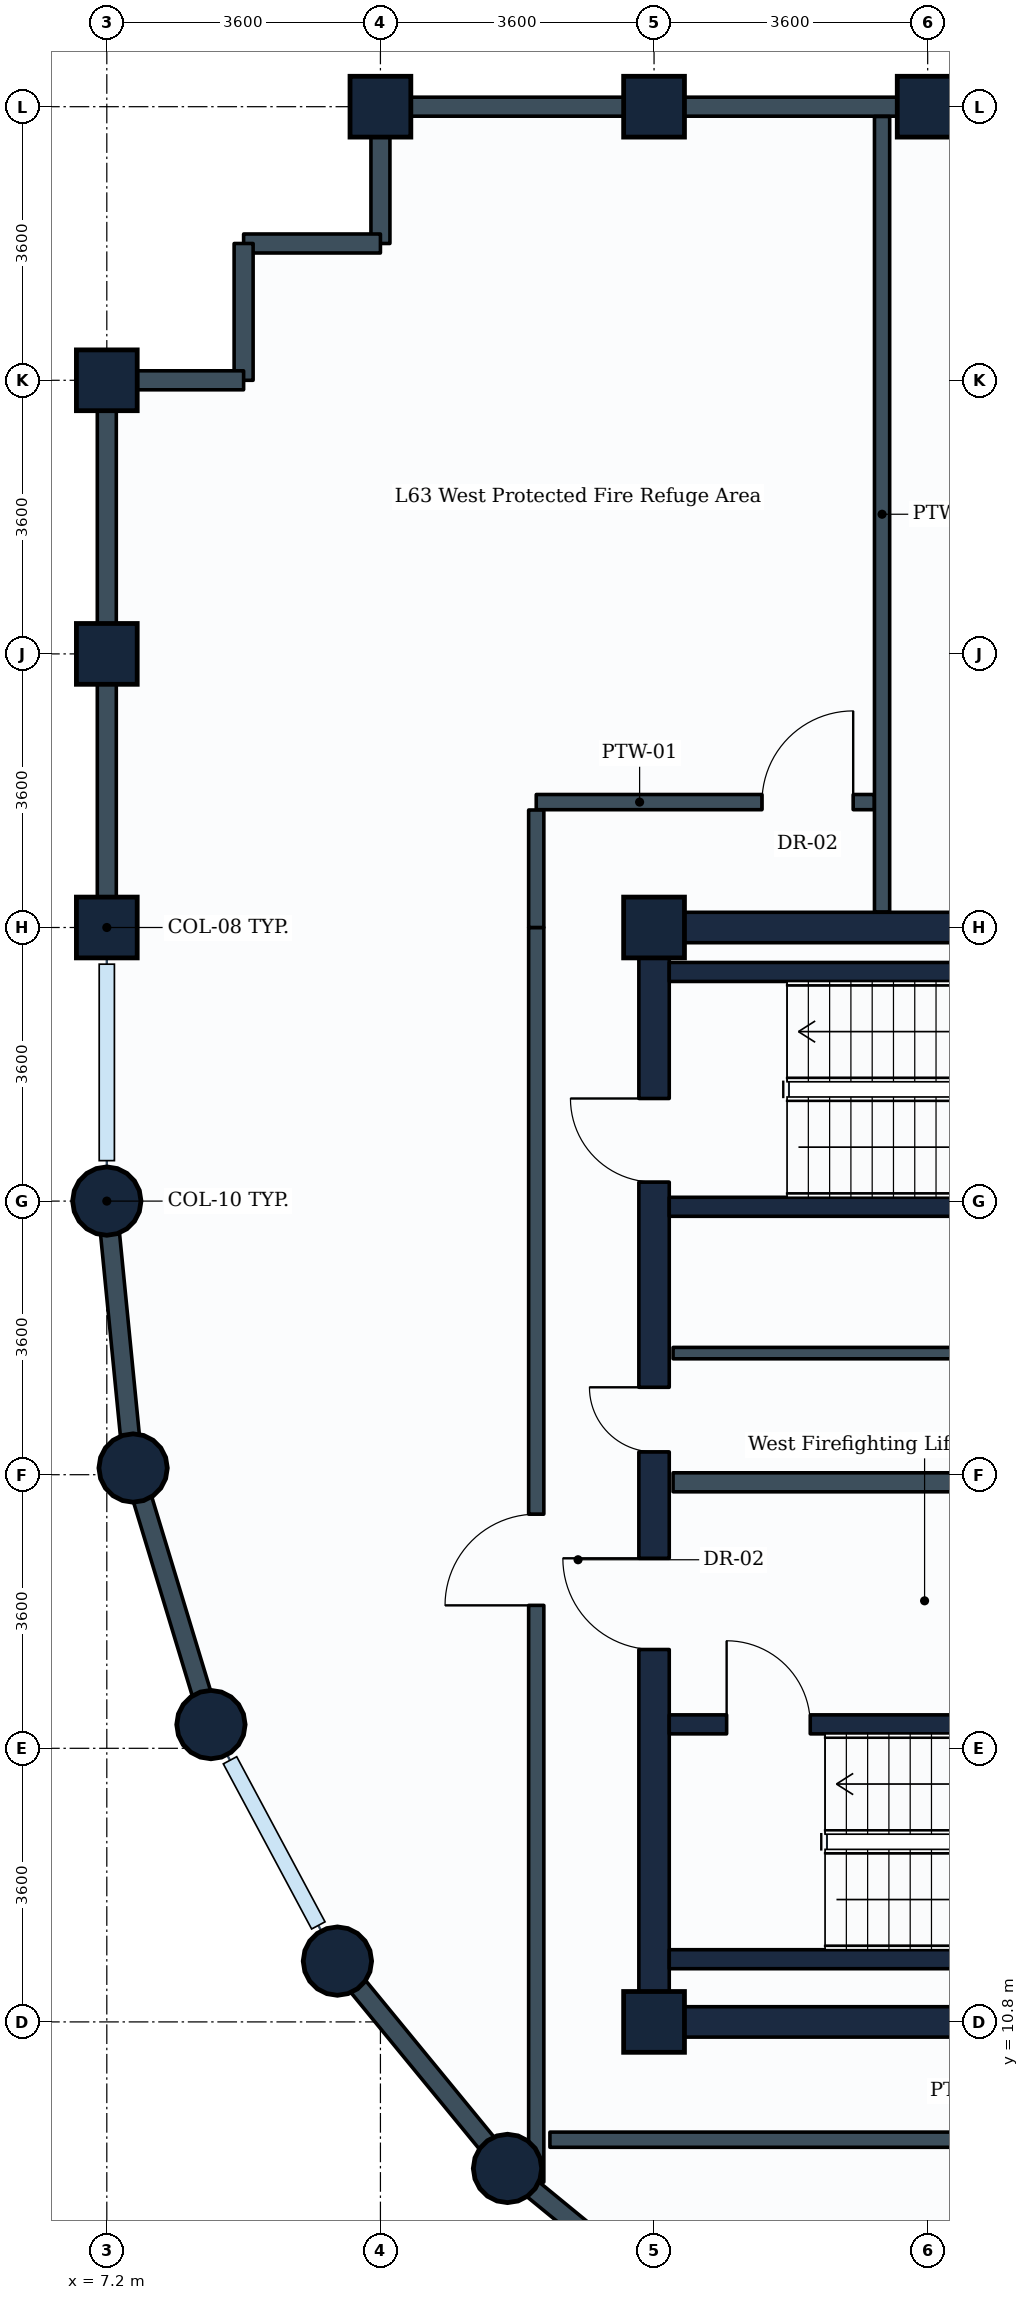
"""IFC4 building model, lengths in metres.
Left out: names, types, materials, properties, quantities, classifications, styles, units other than length and angle.
Written with IfcOpenShell. Run it as: python <this file> out.ifc"""

import sys

from ifc_helpers import new_model, si_unit, direction, frame, frame_2d, origin, origin_2d, place, context, subcontext, project, spatial, rectangle, circle, extrude, element, fill, save


model = new_model("IFC4")
c1 = context("Model", 3, precision=1e-05, world=origin(), true_north=direction((0.0, 1.0)))
c2 = subcontext(c1, "Body", "Model", "MODEL_VIEW")
j1 = project(units=[si_unit("LENGTHUNIT", "METRE"), si_unit("PLANEANGLEUNIT", "RADIAN")], contexts=[c1])
p1 = place(None, origin())
s1 = spatial("IfcSite", under=j1, at=p1, CompositionType="ELEMENT")
p2 = place(p1, origin())
s2 = spatial("IfcBuilding", under=s1, at=p2, CompositionType="ELEMENT")
p3 = place(p2, frame((0.0, 0.0, 249.8)))
s3 = spatial("IfcBuildingStorey", under=s2, at=p3, CompositionType="ELEMENT", Elevation=249.8)
p4 = place(p3, frame((7.2, 21.6, 0.0), z_axis=(0.0, 0.0, 1.0), x_axis=(1.0, 0.0, 0.0)))
e1 = element("IfcColumn", 1, at=p4, inside=s3, PredefinedType="COLUMN", context=c2, shape_type="SweptSolid", body=[
    extrude(circle(Radius=0.45, at=origin_2d()), origin(), (0.0, 0.0, 1.0), 6.0),
])
for number, where, z_axis, x_axis in (
    (2, (7.2, 25.2, 0.0), (0.0, 0.0, 1.0), (0.0, 1.0, 0.0)),
    (3, (7.2, 28.8, 0.0), (0.0, 0.0, 1.0), (0.0, 1.0, 0.0)),
    (4, (7.2, 32.4, 0.0), (0.0, 0.0, 1.0), (0.0, 1.0, 0.0)),
):
    element("IfcColumn", number, at=place(p3, frame(where, z_axis=z_axis, x_axis=x_axis)), inside=s3, PredefinedType="COLUMN", context=c2, shape_type="SweptSolid", body=[
        extrude(rectangle(XDim=0.8, YDim=0.8, at=origin_2d()), origin(), (0.0, 0.0, 1.0), 6.0),
    ])
for number, where, z_axis, x_axis in (
    (5, (7.546, 18.088, 0.0), (0.0, 0.0, 1.0), (1.0, 0.0, 0.0)),
    (6, (8.57, 14.712, 0.0), (0.0, 0.0, 1.0), (1.0, 0.0, 0.0)),
    (7, (10.234, 11.6, 0.0), (0.0, 0.0, 1.0), (1.0, 0.0, 0.0)),
):
    element("IfcColumn", number, at=place(p3, frame(where, z_axis=z_axis, x_axis=x_axis)), inside=s3, PredefinedType="COLUMN", context=c2, shape_type="SweptSolid", body=[
        extrude(circle(Radius=0.45, at=origin_2d()), origin(), (0.0, 0.0, 1.0), 6.0),
    ])
p5 = place(p3, frame((10.8, 36.0, 0.0), z_axis=(0.0, 0.0, 1.0), x_axis=(1.0, 0.0, 0.0)))
e8 = element("IfcColumn", 8, at=p5, inside=s3, PredefinedType="COLUMN", context=c2, shape_type="SweptSolid", body=[
    extrude(rectangle(XDim=0.8, YDim=0.8, at=origin_2d()), origin(), (0.0, 0.0, 1.0), 6.0),
])
p6 = place(p3, frame((12.472, 8.872, 0.0), z_axis=(0.0, 0.0, 1.0), x_axis=(1.0, 0.0, 0.0)))
e9 = element("IfcColumn", 9, at=p6, inside=s3, PredefinedType="COLUMN", context=c2, shape_type="SweptSolid", body=[
    extrude(circle(Radius=0.45, at=origin_2d()), origin(), (0.0, 0.0, 1.0), 6.0),
])
for number, where, z_axis, x_axis in (
    (10, (14.4, 10.8, 0.0), (0.0, 0.0, 1.0), (1.0, 0.0, 0.0)),
    (11, (14.4, 25.2, 0.0), (0.0, 0.0, 1.0), (1.0, 0.0, 0.0)),
    (12, (14.4, 36.0, 0.0), (0.0, 0.0, 1.0), (1.0, 0.0, 0.0)),
    (13, (18.0, 36.0, 0.0), (0.0, 0.0, 1.0), (1.0, 0.0, 0.0)),
):
    element("IfcColumn", number, at=place(p3, frame(where, z_axis=z_axis, x_axis=x_axis)), inside=s3, PredefinedType="COLUMN", context=c2, shape_type="SweptSolid", body=[
        extrude(rectangle(XDim=0.8, YDim=0.8, at=origin_2d()), origin(), (0.0, 0.0, 1.0), 6.0),
    ])
p7 = place(p3, frame((14.4, 36.0, 0.0), z_axis=(0.0, 0.0, 1.0), x_axis=(1.0, 0.0, 0.0)))
e14 = element("IfcWall", 14, at=p7, inside=s3, PredefinedType="STANDARD", context=c2, shape_type="SweptSolid", body=[
    extrude(rectangle(XDim=3.6, YDim=0.25, at=frame_2d((1.8, 0.0))), origin(), (0.0, 0.0, 1.0), 5.23),
])
p8 = place(p3, frame((10.8, 36.0, 0.0), z_axis=(0.0, 0.0, 1.0), x_axis=(1.0, 0.0, 0.0)))
e15 = element("IfcWall", 15, at=p8, inside=s3, PredefinedType="STANDARD", context=c2, shape_type="SweptSolid", body=[
    extrude(rectangle(XDim=3.6, YDim=0.25, at=frame_2d((1.8, 0.0))), origin(), (0.0, 0.0, 1.0), 5.23),
])
p9 = place(p3, frame((10.8, 34.2, 0.0), z_axis=(0.0, 0.0, 1.0), x_axis=(0.0, 1.0, 0.0)))
e16 = element("IfcWall", 16, at=p9, inside=s3, PredefinedType="STANDARD", context=c2, shape_type="SweptSolid", body=[
    extrude(rectangle(XDim=1.8, YDim=0.25, at=frame_2d((0.9, 0.0))), origin(), (0.0, 0.0, 1.0), 5.23),
])
for number, where, z_axis, x_axis in (
    (17, (9.0, 34.2, 0.0), (0.0, 0.0, 1.0), (1.0, 0.0, 0.0)),
    (18, (9.0, 32.4, 0.0), (0.0, 0.0, 1.0), (0.0, 1.0, 0.0)),
):
    element("IfcWall", number, at=place(p3, frame(where, z_axis=z_axis, x_axis=x_axis)), inside=s3, PredefinedType="STANDARD", context=c2, shape_type="SweptSolid", body=[
        extrude(rectangle(XDim=1.8, YDim=0.25, at=frame_2d((0.9, 0.0))), origin(), (0.0, 0.0, 1.0), 5.735),
    ])
p10 = place(p3, frame((7.2, 32.4, 0.0), z_axis=(0.0, 0.0, 1.0), x_axis=(1.0, 0.0, 0.0)))
e19 = element("IfcWall", 19, at=p10, inside=s3, PredefinedType="STANDARD", context=c2, shape_type="SweptSolid", body=[
    extrude(rectangle(XDim=1.8, YDim=0.25, at=frame_2d((0.9, 0.0))), origin(), (0.0, 0.0, 1.0), 5.23),
])
p11 = place(p3, frame((7.2, 28.8, 0.0), z_axis=(0.0, 0.0, 1.0), x_axis=(0.0, 1.0, 0.0)))
e20 = element("IfcWall", 20, at=p11, inside=s3, PredefinedType="STANDARD", context=c2, shape_type="SweptSolid", body=[
    extrude(rectangle(XDim=3.6, YDim=0.25, at=frame_2d((1.8, 0.0))), origin(), (0.0, 0.0, 1.0), 5.23),
])
p12 = place(p3, frame((7.2, 25.2, 0.0), z_axis=(0.0, 0.0, 1.0), x_axis=(0.0, 1.0, 0.0)))
e21 = element("IfcWall", 21, at=p12, inside=s3, PredefinedType="STANDARD", context=c2, shape_type="SweptSolid", body=[
    extrude(rectangle(XDim=3.6, YDim=0.25, at=frame_2d((1.8, 0.0))), origin(), (0.0, 0.0, 1.0), 5.23),
])
p13 = place(p3, frame((7.546, 18.088, 0.0), z_axis=(0.0, 0.0, 1.0), x_axis=(-0.09802417461, 0.995184033831, 0.0)))
e22 = element("IfcWall", 22, at=p13, inside=s3, PredefinedType="STANDARD", context=c2, shape_type="SweptSolid", body=[
    extrude(rectangle(XDim=3.529, YDim=0.25, at=frame_2d((1.765, 0.0))), origin(), (0.0, 0.0, 1.0), 5.23),
])
p14 = place(p3, frame((8.57, 14.712, 0.0), z_axis=(0.0, 0.0, 1.0), x_axis=(-0.290305086481, 0.956934144423, 0.0)))
e23 = element("IfcWall", 23, at=p14, inside=s3, PredefinedType="STANDARD", context=c2, shape_type="SweptSolid", body=[
    extrude(rectangle(XDim=3.528, YDim=0.25, at=frame_2d((1.764, 0.0))), origin(), (0.0, 0.0, 1.0), 5.23),
])
for number, where, z_axis, x_axis in (
    (24, (12.472, 8.872, 0.0), (0.0, 0.0, 1.0), (-0.634, 0.773, 0.0)),
    (25, (15.2, 6.634, 0.0), (0.0, 0.0, 1.0), (-0.773, 0.634, 0.0)),
):
    element("IfcWall", number, at=place(p3, frame(where, z_axis=z_axis, x_axis=x_axis)), inside=s3, PredefinedType="STANDARD", context=c2, shape_type="SweptSolid", body=[
        extrude(rectangle(XDim=3.529, YDim=0.25, at=frame_2d((1.764, 0.0))), origin(), (0.0, 0.0, 1.0), 5.23),
    ])
p15 = place(p3, frame((14.4, 10.8, 0.0), z_axis=(0.0, 0.0, 1.0), x_axis=(1.0, 0.0, 0.0)))
e26 = element("IfcWall", 26, at=p15, inside=s3, PredefinedType="SHEAR", context=c2, shape_type="SweptSolid", body=[
    extrude(rectangle(XDim=18.0, YDim=0.4, at=frame_2d((9.0, 0.0))), origin(), (0.0, 0.0, 1.0), 5.75),
])
p16 = place(p3, frame((14.4, 25.2, 0.0), z_axis=(0.0, 0.0, 1.0), x_axis=(1.0, 0.0, 0.0)))
e27 = element("IfcWall", 27, at=p16, inside=s3, PredefinedType="SHEAR", context=c2, shape_type="SweptSolid", body=[
    extrude(rectangle(XDim=10.8, YDim=0.4, at=frame_2d((5.4, 0.0))), origin(), (0.0, 0.0, 1.0), 5.75),
])
p17 = place(p3, frame((14.4, 10.8, 0.0), z_axis=(0.0, 0.0, 1.0), x_axis=(0.0, 1.0, 0.0)))
e28 = element("IfcWall", 28, at=p17, inside=s3, PredefinedType="SHEAR", context=c2, shape_type="SweptSolid", body=[
    extrude(rectangle(XDim=14.4, YDim=0.4, at=frame_2d((7.2, 0.0))), origin(), (0.0, 0.0, 1.0), 5.75),
])
p18 = place(p17, frame((11.05, 0.0, 0.0)))
e29 = element("IfcOpeningElement", 29, at=p18, cuts=e28, PredefinedType="OPENING", context=c2, shape_type="SweptSolid", body=[
    extrude(rectangle(XDim=1.1, YDim=2.1, at=frame_2d((0.55, 1.05))), frame((0.0, 0.21, 0.0), z_axis=(0.0, -1.0, 0.0), x_axis=(1.0, 0.0, 0.0)), (0.0, 0.0, 1.0), 0.42),
])
p19 = place(p17, frame((4.9, 0.0, 0.0)))
e30 = element("IfcOpeningElement", 30, at=p19, cuts=e28, PredefinedType="OPENING", context=c2, shape_type="SweptSolid", body=[
    extrude(rectangle(XDim=1.2, YDim=2.1, at=frame_2d((0.6, 1.05))), frame((0.0, 0.21, 0.0), z_axis=(0.0, -1.0, 0.0), x_axis=(1.0, 0.0, 0.0)), (0.0, 0.0, 1.0), 0.42),
])
p20 = place(p17, frame((7.5, 0.0, 0.0)))
e31 = element("IfcOpeningElement", 31, at=p20, cuts=e28, PredefinedType="OPENING", context=c2, shape_type="SweptSolid", body=[
    extrude(rectangle(XDim=0.85, YDim=2.1, at=frame_2d((0.425, 1.05))), frame((0.0, 0.21, 0.0), z_axis=(0.0, -1.0, 0.0), x_axis=(1.0, 0.0, 0.0)), (0.0, 0.0, 1.0), 0.42),
])
p21 = place(p3, frame((14.6, 11.625, 0.0), z_axis=(0.0, 0.0, 1.0), x_axis=(1.0, 0.0, 0.0)))
e32 = element("IfcWall", 32, at=p21, inside=s3, PredefinedType="SHEAR", context=c2, shape_type="SweptSolid", body=[
    extrude(rectangle(XDim=8.75, YDim=0.25, at=frame_2d((4.375, 0.0))), origin(), (0.0, 0.0, 1.0), 5.75),
])
p22 = place(p3, frame((14.6, 14.715, 0.0), z_axis=(0.0, 0.0, 1.0), x_axis=(1.0, 0.0, 0.0)))
e33 = element("IfcWall", 33, at=p22, inside=s3, PredefinedType="SHEAR", context=c2, shape_type="SweptSolid", body=[
    extrude(rectangle(XDim=8.75, YDim=0.25, at=frame_2d((4.375, 0.0))), origin(), (0.0, 0.0, 1.0), 5.75),
])
p23 = place(p22, frame((0.755, 0.0, 0.0)))
e34 = element("IfcOpeningElement", 34, at=p23, cuts=e33, PredefinedType="OPENING", context=c2, shape_type="SweptSolid", body=[
    extrude(rectangle(XDim=1.1, YDim=2.1, at=frame_2d((0.55, 1.05))), frame((0.0, 0.135, 0.0), z_axis=(0.0, -1.0, 0.0), x_axis=(1.0, 0.0, 0.0)), (0.0, 0.0, 1.0), 0.27),
])
for number, where, z_axis, x_axis in (
    (35, (14.6, 21.525, 0.0), (0.0, 0.0, 1.0), (1.0, 0.0, 0.0)),
    (36, (14.6, 24.615, 0.0), (0.0, 0.0, 1.0), (1.0, 0.0, 0.0)),
):
    element("IfcWall", number, at=place(p3, frame(where, z_axis=z_axis, x_axis=x_axis)), inside=s3, PredefinedType="SHEAR", context=c2, shape_type="SweptSolid", body=[
        extrude(rectangle(XDim=8.3, YDim=0.25, at=frame_2d((4.15, 0.0))), origin(), (0.0, 0.0, 1.0), 5.75),
    ])
p24 = place(p3, frame((14.65, 17.9, 0.0), z_axis=(0.0, 0.0, 1.0), x_axis=(1.0, 0.0, 0.0)))
e37 = element("IfcWall", 37, at=p24, inside=s3, PredefinedType="PARTITIONING", context=c2, shape_type="SweptSolid", body=[
    extrude(rectangle(XDim=7.15, YDim=0.25, at=frame_2d((3.575, 0.0))), origin(), (0.0, 0.0, 1.0), 5.735),
])
p25 = place(p3, frame((14.65, 19.6, 0.0), z_axis=(0.0, 0.0, 1.0), x_axis=(1.0, 0.0, 0.0)))
e38 = element("IfcWall", 38, at=p25, inside=s3, PredefinedType="PARTITIONING", context=c2, shape_type="SweptSolid", body=[
    extrude(rectangle(XDim=10.13, YDim=0.15, at=frame_2d((5.065, 0.0))), origin(), (0.0, 0.0, 1.0), 5.735),
])
p26 = place(p3, frame((17.4, 25.404, 0.0), z_axis=(0.0, 0.0, 1.0), x_axis=(0.0, 1.0, 0.0)))
e39 = element("IfcWall", 39, at=p26, inside=s3, PredefinedType="PARTITIONING", context=c2, shape_type="SweptSolid", body=[
    extrude(rectangle(XDim=10.467, YDim=0.2, at=frame_2d((5.233, 0.0))), origin(), (0.0, 0.0, 1.0), 5.23),
])
p27 = place(p3, frame((12.85, 8.691, 0.0), z_axis=(0.0, 0.0, 1.0), x_axis=(0.0, 1.0, 0.0)))
e40 = element("IfcWall", 40, at=p27, inside=s3, PredefinedType="PARTITIONING", context=c2, shape_type="SweptSolid", body=[
    extrude(rectangle(XDim=16.509, YDim=0.2, at=frame_2d((8.254, 0.0))), origin(), (0.0, 0.0, 1.0), 5.23),
])
p28 = place(p27, frame((7.59, 0.0, 0.0)))
e41 = element("IfcOpeningElement", 41, at=p28, cuts=e40, PredefinedType="OPENING", context=c2, shape_type="SweptSolid", body=[
    extrude(rectangle(XDim=1.2, YDim=2.1, at=frame_2d((0.6, 1.05))), frame((0.0, 0.11, 0.0), z_axis=(0.0, -1.0, 0.0), x_axis=(1.0, 0.0, 0.0)), (0.0, 0.0, 1.0), 0.22),
])
p29 = place(p3, frame((12.85, 26.85, 0.0), z_axis=(0.0, 0.0, 1.0), x_axis=(1.0, 0.0, 0.0)))
e42 = element("IfcWall", 42, at=p29, inside=s3, PredefinedType="PARTITIONING", context=c2, shape_type="SweptSolid", body=[
    extrude(rectangle(XDim=4.446, YDim=0.2, at=frame_2d((2.223, 0.0))), origin(), (0.0, 0.0, 1.0), 5.735),
])
p30 = place(p29, frame((2.97, 0.0, 0.0)))
e43 = element("IfcOpeningElement", 43, at=p30, cuts=e42, PredefinedType="OPENING", context=c2, shape_type="SweptSolid", body=[
    extrude(rectangle(XDim=1.2, YDim=2.1, at=frame_2d((0.6, 1.05))), frame((0.0, 0.11, 0.0), z_axis=(0.0, -1.0, 0.0), x_axis=(1.0, 0.0, 0.0)), (0.0, 0.0, 1.0), 0.22),
])
p31 = place(p3, frame((12.85, 25.2, 0.0), z_axis=(0.0, 0.0, 1.0), x_axis=(0.0, 1.0, 0.0)))
e44 = element("IfcWall", 44, at=p31, inside=s3, PredefinedType="PARTITIONING", context=c2, shape_type="SweptSolid", body=[
    extrude(rectangle(XDim=1.546, YDim=0.2, at=frame_2d((0.773, 0.0))), origin(), (0.0, 0.0, 1.0), 5.735),
])
p32 = place(p3, frame((13.03, 9.25, 0.0), z_axis=(0.0, 0.0, 1.0), x_axis=(1.0, 0.0, 0.0)))
e45 = element("IfcWall", 45, at=p32, inside=s3, PredefinedType="PARTITIONING", context=c2, shape_type="SweptSolid", body=[
    extrude(rectangle(XDim=19.37, YDim=0.2, at=frame_2d((9.685, 0.0))), origin(), (0.0, 0.0, 1.0), 5.42),
])
p33 = place(p32, frame((11.245, 0.0, 0.0)))
e46 = element("IfcOpeningElement", 46, at=p33, cuts=e45, PredefinedType="OPENING", context=c2, shape_type="SweptSolid", body=[
    extrude(rectangle(XDim=1.2, YDim=2.1, at=frame_2d((0.6, 1.05))), frame((0.0, 0.11, 0.0), z_axis=(0.0, -1.0, 0.0), x_axis=(1.0, 0.0, 0.0)), (0.0, 0.0, 1.0), 0.22),
])
p34 = place(p23, origin())
e47 = element("IfcDoor", 47, at=p34, inside=s3, OperationType="SINGLE_SWING_LEFT", PredefinedType="DOOR", context=c2, shape_type="SweptSolid", body=[
    extrude(rectangle(XDim=1.1, YDim=2.1, at=frame_2d((0.55, 1.05))), frame((0.0, 0.025, 0.0), z_axis=(0.0, -1.0, 0.0), x_axis=(1.0, 0.0, 0.0)), (0.0, 0.0, 1.0), 0.05),
])
fill(e34, e47)
p35 = place(p18, origin())
e48 = element("IfcDoor", 48, at=p35, inside=s3, OperationType="SINGLE_SWING_RIGHT", PredefinedType="DOOR", context=c2, shape_type="SweptSolid", body=[
    extrude(rectangle(XDim=1.1, YDim=2.1, at=frame_2d((0.55, 1.05))), frame((0.0, 0.025, 0.0), z_axis=(0.0, -1.0, 0.0), x_axis=(1.0, 0.0, 0.0)), (0.0, 0.0, 1.0), 0.05),
])
fill(e29, e48)
p36 = place(p19, origin())
e49 = element("IfcDoor", 49, at=p36, inside=s3, OperationType="SINGLE_SWING_RIGHT", PredefinedType="DOOR", context=c2, shape_type="SweptSolid", body=[
    extrude(rectangle(XDim=1.2, YDim=2.1, at=frame_2d((0.6, 1.05))), frame((0.0, 0.025, 0.0), z_axis=(0.0, -1.0, 0.0), x_axis=(1.0, 0.0, 0.0)), (0.0, 0.0, 1.0), 0.05),
])
fill(e30, e49)
p37 = place(p20, origin())
e50 = element("IfcDoor", 50, at=p37, inside=s3, OperationType="SINGLE_SWING_RIGHT", PredefinedType="DOOR", context=c2, shape_type="SweptSolid", body=[
    extrude(rectangle(XDim=0.85, YDim=2.1, at=frame_2d((0.425, 1.05))), frame((0.0, 0.025, 0.0), z_axis=(0.0, -1.0, 0.0), x_axis=(1.0, 0.0, 0.0)), (0.0, 0.0, 1.0), 0.05),
])
fill(e31, e50)
p38 = place(p28, origin())
e51 = element("IfcDoor", 51, at=p38, inside=s3, OperationType="SINGLE_SWING_LEFT", PredefinedType="DOOR", context=c2, shape_type="SweptSolid", body=[
    extrude(rectangle(XDim=1.2, YDim=2.1, at=frame_2d((0.6, 1.05))), frame((0.0, 0.025, 0.0), z_axis=(0.0, -1.0, 0.0), x_axis=(1.0, 0.0, 0.0)), (0.0, 0.0, 1.0), 0.05),
])
fill(e41, e51)
p39 = place(p30, origin())
e52 = element("IfcDoor", 52, at=p39, inside=s3, OperationType="SINGLE_SWING_RIGHT", PredefinedType="DOOR", context=c2, shape_type="SweptSolid", body=[
    extrude(rectangle(XDim=1.2, YDim=2.1, at=frame_2d((0.6, 1.05))), frame((0.0, 0.025, 0.0), z_axis=(0.0, -1.0, 0.0), x_axis=(1.0, 0.0, 0.0)), (0.0, 0.0, 1.0), 0.05),
])
fill(e43, e52)
save(model, sys.argv[1])
